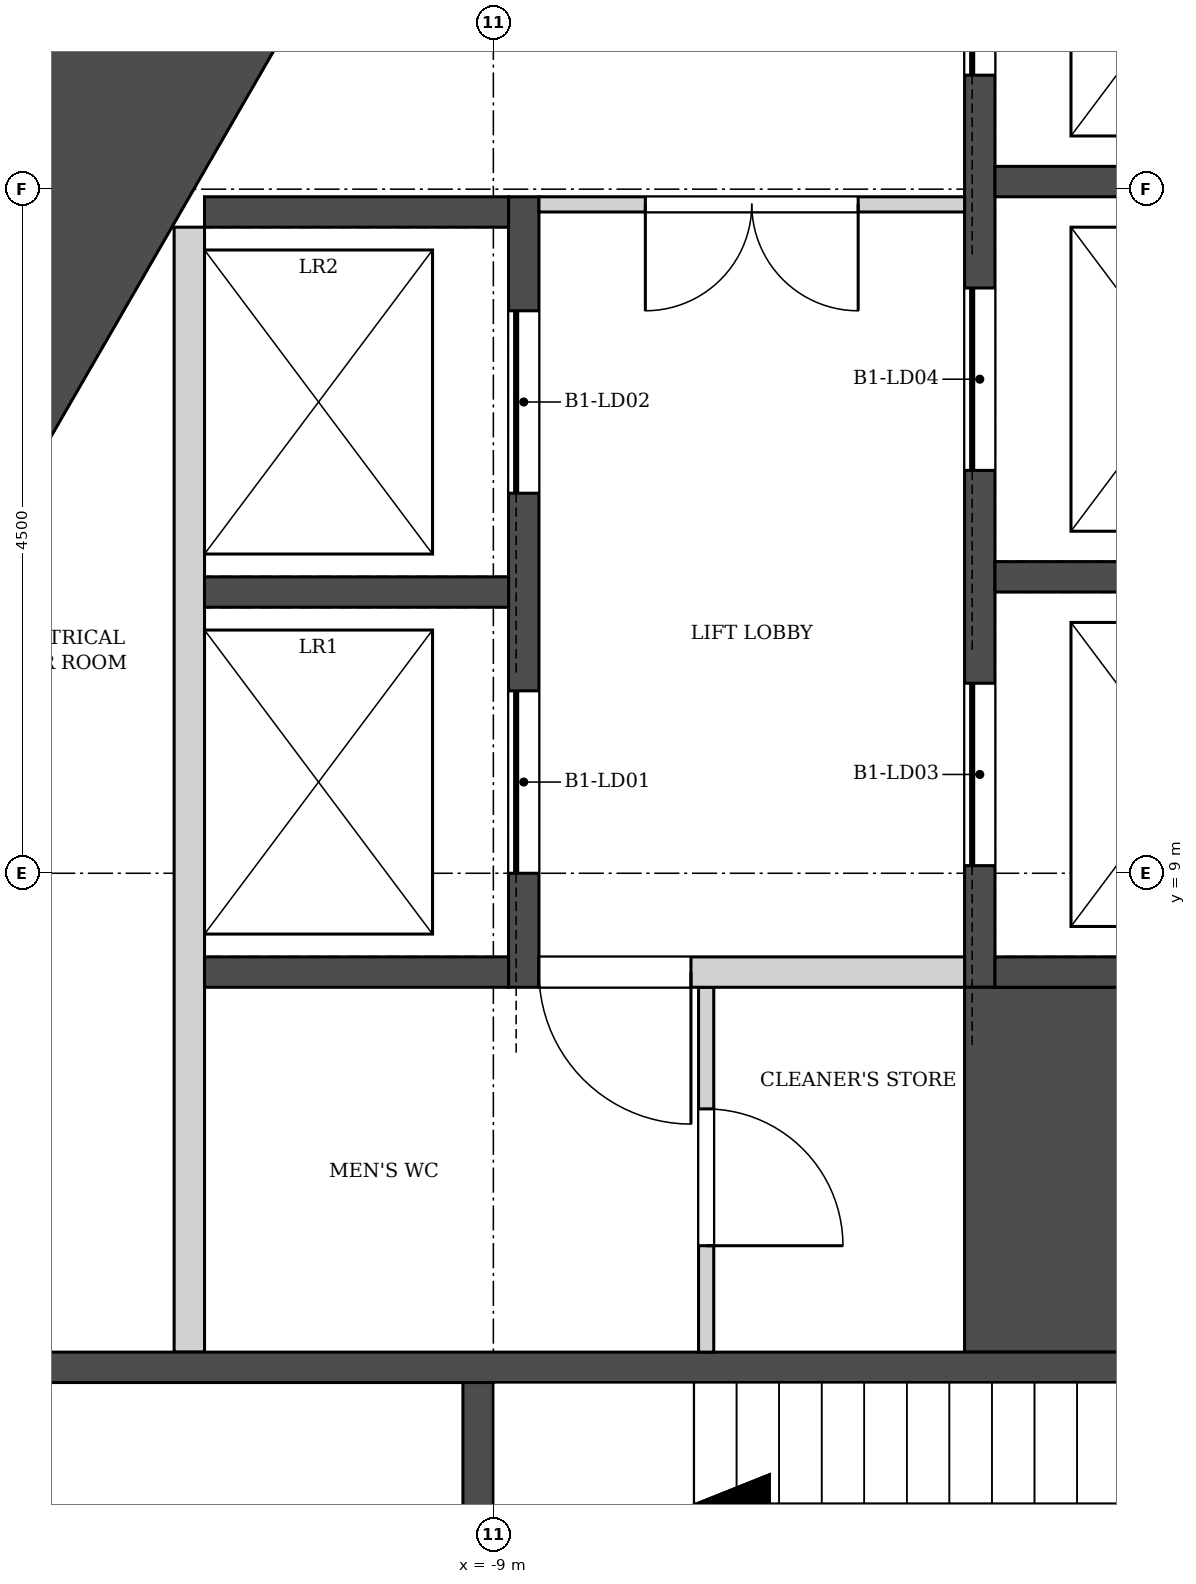
"""IFC4 building model, lengths in metres.
Left out: names, types, materials, properties, quantities, classifications, styles, units other than length and angle.
Written with IfcOpenShell. Run it as: python <this file> out.ifc"""

import sys

from ifc_helpers import new_model, si_unit, direction, frame, frame_2d, origin, place, context, subcontext, project, spatial, rectangle, extrude, element, fill, save


model = new_model("IFC4")
c1 = context("Model", 3, precision=1e-05, world=origin(), true_north=direction((0.0, 1.0)))
c2 = subcontext(c1, "Body", "Model", "MODEL_VIEW")
j1 = project(units=[si_unit("LENGTHUNIT", "METRE"), si_unit("PLANEANGLEUNIT", "RADIAN")], contexts=[c1])
p1 = place(None, origin())
s1 = spatial("IfcSite", under=j1, at=p1, CompositionType="ELEMENT")
p2 = place(p1, origin())
s2 = spatial("IfcBuilding", under=s1, at=p2, CompositionType="ELEMENT")
p3 = place(p2, frame((0.0, 0.0, -8.0)))
s3 = spatial("IfcBuildingStorey", under=s2, at=p3, CompositionType="ELEMENT", Elevation=-8.0)
p4 = place(p3, frame((-4.856, 74.528, 0.0), z_axis=(0.0, 0.0, 1.0), x_axis=(-0.499999312333, -0.866025800809, 0.0)))
e1 = element("IfcWall", 1, at=p4, inside=s3, PredefinedType="SOLIDWALL", context=c2, shape_type="SweptSolid", body=[
    extrude(rectangle(XDim=76.231, YDim=0.6, at=frame_2d((38.115, 0.0))), origin(), (0.0, 0.0, 1.0), 7.6),
])
p5 = place(p3, frame((-8.805, 18.65, 0.0), z_axis=(0.0, 0.0, 1.0), x_axis=(-0.50000187635, -0.866024320471, 0.0)))
e2 = element("IfcWall", 2, at=p5, inside=s3, PredefinedType="SHEAR", context=c2, shape_type="SweptSolid", body=[
    extrude(rectangle(XDim=9.177, YDim=1.4, at=frame_2d((4.588, 0.0))), origin(), (0.0, 0.0, 1.0), 8.0),
])
p6 = place(p3, frame((-11.0, 5.85, 0.0), z_axis=(0.0, 0.0, 1.0), x_axis=(0.0, 1.0, 0.0)))
e3 = element("IfcWall", 3, at=p6, inside=s3, PredefinedType="SOLIDWALL", context=c2, shape_type="SweptSolid", body=[
    extrude(rectangle(XDim=7.4, YDim=0.2, at=frame_2d((3.7, 0.0))), origin(), (0.0, 0.0, 1.0), 7.6),
])
p7 = place(p3, frame((-8.8, 8.25, -0.35), z_axis=(0.0, 0.0, 1.0), x_axis=(0.0, 1.0, 0.0)))
e4 = element("IfcWall", 4, at=p7, inside=s3, PredefinedType="SOLIDWALL", context=c2, shape_type="SweptSolid", body=[
    extrude(rectangle(XDim=5.2, YDim=0.2, at=frame_2d((2.6, 0.0))), origin(), (0.0, 0.0, 1.0), 7.95),
])
p8 = place(p7, frame((0.75, 0.0, 0.35)))
e5 = element("IfcOpeningElement", 5, at=p8, cuts=e4, PredefinedType="OPENING", context=c2, shape_type="SweptSolid", body=[
    extrude(rectangle(XDim=1.2, YDim=2.1, at=frame_2d((0.6, 1.05))), frame((0.0, 0.11, 0.0), z_axis=(0.0, -1.0, 0.0), x_axis=(1.0, 0.0, 0.0)), (0.0, 0.0, 1.0), 0.22),
])
p9 = place(p7, frame((3.25, 0.0, 0.35)))
e6 = element("IfcOpeningElement", 6, at=p9, cuts=e4, PredefinedType="OPENING", context=c2, shape_type="SweptSolid", body=[
    extrude(rectangle(XDim=1.2, YDim=2.1, at=frame_2d((0.6, 1.05))), frame((0.0, 0.11, 0.0), z_axis=(0.0, -1.0, 0.0), x_axis=(1.0, 0.0, 0.0)), (0.0, 0.0, 1.0), 0.22),
])
p10 = place(p3, frame((-5.8, 8.25, -0.35), z_axis=(0.0, 0.0, 1.0), x_axis=(0.0, 1.0, 0.0)))
e7 = element("IfcWall", 7, at=p10, inside=s3, PredefinedType="SOLIDWALL", context=c2, shape_type="SweptSolid", body=[
    extrude(rectangle(XDim=8.0, YDim=0.2, at=frame_2d((4.0, 0.0))), origin(), (0.0, 0.0, 1.0), 7.95),
])
p11 = place(p10, frame((0.8, 0.0, 0.35)))
e8 = element("IfcOpeningElement", 8, at=p11, cuts=e7, PredefinedType="OPENING", context=c2, shape_type="SweptSolid", body=[
    extrude(rectangle(XDim=1.2, YDim=2.1, at=frame_2d((0.6, 1.05))), frame((0.0, 0.11, 0.0), z_axis=(0.0, -1.0, 0.0), x_axis=(1.0, 0.0, 0.0)), (0.0, 0.0, 1.0), 0.22),
])
p12 = place(p10, frame((3.4, 0.0, 0.35)))
e9 = element("IfcOpeningElement", 9, at=p12, cuts=e7, PredefinedType="OPENING", context=c2, shape_type="SweptSolid", body=[
    extrude(rectangle(XDim=1.2, YDim=2.1, at=frame_2d((0.6, 1.05))), frame((0.0, 0.11, 0.0), z_axis=(0.0, -1.0, 0.0), x_axis=(1.0, 0.0, 0.0)), (0.0, 0.0, 1.0), 0.22),
])
p13 = place(p10, frame((6.0, 0.0, 0.35)))
e10 = element("IfcOpeningElement", 10, at=p13, cuts=e7, PredefinedType="OPENING", context=c2, shape_type="SweptSolid", body=[
    extrude(rectangle(XDim=1.2, YDim=2.1, at=frame_2d((0.6, 1.05))), frame((0.0, 0.11, 0.0), z_axis=(0.0, -1.0, 0.0), x_axis=(1.0, 0.0, 0.0)), (0.0, 0.0, 1.0), 0.22),
])
p14 = place(p3, frame((-5.2, 5.85, -0.35), z_axis=(0.0, 0.0, 1.0), x_axis=(0.0, 1.0, 0.0)))
e11 = element("IfcWall", 11, at=p14, inside=s3, PredefinedType="SOLIDWALL", context=c2, shape_type="SweptSolid", body=[
    extrude(rectangle(XDim=2.4, YDim=1.4, at=frame_2d((1.2, 0.0))), origin(), (0.0, 0.0, 1.0), 7.95),
])
p15 = place(p3, frame((-10.9, 8.35, -0.35), z_axis=(0.0, 0.0, 1.0), x_axis=(1.0, 0.0, 0.0)))
e12 = element("IfcWall", 12, at=p15, inside=s3, PredefinedType="SOLIDWALL", context=c2, shape_type="SweptSolid", body=[
    extrude(rectangle(XDim=2.0, YDim=0.2, at=frame_2d((1.0, 0.0))), origin(), (0.0, 0.0, 1.0), 7.95),
])
p16 = place(p3, frame((-5.7, 8.35, -0.35), z_axis=(0.0, 0.0, 1.0), x_axis=(1.0, 0.0, 0.0)))
e13 = element("IfcWall", 13, at=p16, inside=s3, PredefinedType="SOLIDWALL", context=c2, shape_type="SweptSolid", body=[
    extrude(rectangle(XDim=4.2, YDim=0.2, at=frame_2d((2.1, 0.0))), origin(), (0.0, 0.0, 1.0), 7.95),
])
p17 = place(p3, frame((-12.6, 5.75, -0.35), z_axis=(0.0, 0.0, 1.0), x_axis=(1.0, 0.0, 0.0)))
e14 = element("IfcWall", 14, at=p17, inside=s3, PredefinedType="SOLIDWALL", context=c2, shape_type="SweptSolid", body=[
    extrude(rectangle(XDim=11.4, YDim=0.2, at=frame_2d((5.7, 0.0))), origin(), (0.0, 0.0, 1.0), 7.95),
])
p18 = place(p3, frame((-9.1, 2.25, -0.35), z_axis=(0.0, 0.0, 1.0), x_axis=(0.0, 1.0, 0.0)))
e15 = element("IfcWall", 15, at=p18, inside=s3, PredefinedType="SOLIDWALL", context=c2, shape_type="SweptSolid", body=[
    extrude(rectangle(XDim=3.4, YDim=0.2, at=frame_2d((1.7, 0.0))), origin(), (0.0, 0.0, 1.0), 7.95),
])
p19 = place(p18, frame((0.2, 0.0, 0.35)))
e16 = element("IfcOpeningElement", 16, at=p19, cuts=e15, PredefinedType="OPENING", context=c2, shape_type="SweptSolid", body=[
    extrude(rectangle(XDim=1.2, YDim=2.1, at=frame_2d((0.6, 1.05))), frame((0.0, 0.11, 0.0), z_axis=(0.0, -1.0, 0.0), x_axis=(1.0, 0.0, 0.0)), (0.0, 0.0, 1.0), 0.22),
])
for number, where, z_axis, x_axis in (
    (17, (-10.9, 10.85, -0.35), (0.0, 0.0, 1.0), (1.0, 0.0, 0.0)),
    (18, (-10.9, 13.35, -0.35), (0.0, 0.0, 1.0), (1.0, 0.0, 0.0)),
    (19, (-5.7, 10.95, -0.35), (0.0, 0.0, 1.0), (1.0, 0.0, 0.0)),
    (20, (-5.7, 13.55, -0.35), (0.0, 0.0, 1.0), (1.0, 0.0, 0.0)),
):
    element("IfcWall", number, at=place(p3, frame(where, z_axis=z_axis, x_axis=x_axis)), inside=s3, PredefinedType="SOLIDWALL", context=c2, shape_type="SweptSolid", body=[
        extrude(rectangle(XDim=2.0, YDim=0.2, at=frame_2d((1.0, 0.0))), origin(), (0.0, 0.0, 1.0), 7.95),
    ])
p20 = place(p3, frame((-8.7, 13.4, 0.0), z_axis=(0.0, 0.0, 1.0), x_axis=(1.0, 0.0, 0.0)))
e21 = element("IfcWall", 21, at=p20, inside=s3, PredefinedType="PARTITIONING", context=c2, shape_type="SweptSolid", body=[
    extrude(rectangle(XDim=2.8, YDim=0.1, at=frame_2d((1.4, 0.0))), origin(), (0.0, 0.0, 1.0), 7.6),
])
p21 = place(p20, frame((0.7, 0.0, 0.0)))
e22 = element("IfcOpeningElement", 22, at=p21, cuts=e21, PredefinedType="OPENING", context=c2, shape_type="SweptSolid", body=[
    extrude(rectangle(XDim=1.4, YDim=2.1, at=frame_2d((0.7, 1.05))), frame((0.0, 0.06, 0.0), z_axis=(0.0, -1.0, 0.0), x_axis=(1.0, 0.0, 0.0)), (0.0, 0.0, 1.0), 0.12),
])
p22 = place(p3, frame((-7.6, 5.85, 0.0), z_axis=(0.0, 0.0, 1.0), x_axis=(0.0, 1.0, 0.0)))
e23 = element("IfcWall", 23, at=p22, inside=s3, PredefinedType="PARTITIONING", context=c2, shape_type="SweptSolid", body=[
    extrude(rectangle(XDim=2.4, YDim=0.1, at=frame_2d((1.2, 0.0))), origin(), (0.0, 0.0, 1.0), 7.6),
])
p23 = place(p22, frame((0.7, 0.0, 0.0)))
e24 = element("IfcOpeningElement", 24, at=p23, cuts=e23, PredefinedType="OPENING", context=c2, shape_type="SweptSolid", body=[
    extrude(rectangle(XDim=0.9, YDim=2.1, at=frame_2d((0.45, 1.05))), frame((0.0, 0.06, 0.0), z_axis=(0.0, -1.0, 0.0), x_axis=(1.0, 0.0, 0.0)), (0.0, 0.0, 1.0), 0.12),
])
p24 = place(p3, frame((-8.7, 8.35, 0.0), z_axis=(0.0, 0.0, 1.0), x_axis=(1.0, 0.0, 0.0)))
e25 = element("IfcWall", 25, at=p24, inside=s3, PredefinedType="SOLIDWALL", context=c2, shape_type="SweptSolid", body=[
    extrude(rectangle(XDim=2.8, YDim=0.2, at=frame_2d((1.4, 0.0))), origin(), (0.0, 0.0, 1.0), 7.6),
])
p25 = place(p24, origin())
e26 = element("IfcOpeningElement", 26, at=p25, cuts=e25, PredefinedType="OPENING", context=c2, shape_type="SweptSolid", body=[
    extrude(rectangle(XDim=1.0, YDim=2.1, at=frame_2d((0.5, 1.05))), frame((0.0, 0.11, 0.0), z_axis=(0.0, -1.0, 0.0), x_axis=(1.0, 0.0, 0.0)), (0.0, 0.0, 1.0), 0.22),
])
p26 = place(p8, origin())
e27 = element("IfcDoor", 27, at=p26, inside=s3, OperationType="SLIDING_TO_LEFT", PredefinedType="DOOR", context=c2, shape_type="SweptSolid", body=[
    extrude(rectangle(XDim=1.2, YDim=2.1, at=frame_2d((0.6, 1.05))), frame((0.0, 0.025, 0.0), z_axis=(0.0, -1.0, 0.0), x_axis=(1.0, 0.0, 0.0)), (0.0, 0.0, 1.0), 0.05),
])
fill(e5, e27)
p27 = place(p9, origin())
e28 = element("IfcDoor", 28, at=p27, inside=s3, OperationType="SLIDING_TO_LEFT", PredefinedType="DOOR", context=c2, shape_type="SweptSolid", body=[
    extrude(rectangle(XDim=1.2, YDim=2.1, at=frame_2d((0.6, 1.05))), frame((0.0, 0.025, 0.0), z_axis=(0.0, -1.0, 0.0), x_axis=(1.0, 0.0, 0.0)), (0.0, 0.0, 1.0), 0.05),
])
fill(e6, e28)
p28 = place(p11, origin())
e29 = element("IfcDoor", 29, at=p28, inside=s3, OperationType="SLIDING_TO_LEFT", PredefinedType="DOOR", context=c2, shape_type="SweptSolid", body=[
    extrude(rectangle(XDim=1.2, YDim=2.1, at=frame_2d((0.6, 1.05))), frame((0.0, 0.025, 0.0), z_axis=(0.0, -1.0, 0.0), x_axis=(1.0, 0.0, 0.0)), (0.0, 0.0, 1.0), 0.05),
])
fill(e8, e29)
p29 = place(p12, origin())
e30 = element("IfcDoor", 30, at=p29, inside=s3, OperationType="SLIDING_TO_LEFT", PredefinedType="DOOR", context=c2, shape_type="SweptSolid", body=[
    extrude(rectangle(XDim=1.2, YDim=2.1, at=frame_2d((0.6, 1.05))), frame((0.0, 0.025, 0.0), z_axis=(0.0, -1.0, 0.0), x_axis=(1.0, 0.0, 0.0)), (0.0, 0.0, 1.0), 0.05),
])
fill(e9, e30)
p30 = place(p13, origin())
e31 = element("IfcDoor", 31, at=p30, inside=s3, OperationType="SLIDING_TO_LEFT", PredefinedType="DOOR", context=c2, shape_type="SweptSolid", body=[
    extrude(rectangle(XDim=1.2, YDim=2.1, at=frame_2d((0.6, 1.05))), frame((0.0, 0.025, 0.0), z_axis=(0.0, -1.0, 0.0), x_axis=(1.0, 0.0, 0.0)), (0.0, 0.0, 1.0), 0.05),
])
fill(e10, e31)
p31 = place(p21, frame((1.4, 0.0, 0.0), z_axis=(0.0, 0.0, 1.0), x_axis=(-1.0, 0.0, 0.0)))
e32 = element("IfcDoor", 32, at=p31, inside=s3, OperationType="DOUBLE_DOOR_SINGLE_SWING", PredefinedType="DOOR", context=c2, shape_type="SweptSolid", body=[
    extrude(rectangle(XDim=1.4, YDim=2.1, at=frame_2d((0.7, 1.05))), frame((0.0, 0.025, 0.0), z_axis=(0.0, -1.0, 0.0), x_axis=(1.0, 0.0, 0.0)), (0.0, 0.0, 1.0), 0.05),
])
fill(e22, e32)
p32 = place(p25, frame((1.0, 0.0, 0.0), z_axis=(0.0, 0.0, 1.0), x_axis=(-1.0, 0.0, 0.0)))
e33 = element("IfcDoor", 33, at=p32, inside=s3, OperationType="SINGLE_SWING_LEFT", PredefinedType="DOOR", context=c2, shape_type="SweptSolid", body=[
    extrude(rectangle(XDim=1.0, YDim=2.1, at=frame_2d((0.5, 1.05))), frame((0.0, 0.025, 0.0), z_axis=(0.0, -1.0, 0.0), x_axis=(1.0, 0.0, 0.0)), (0.0, 0.0, 1.0), 0.05),
])
fill(e26, e33)
p33 = place(p23, frame((0.9, 0.0, 0.0), z_axis=(0.0, 0.0, 1.0), x_axis=(-1.0, 0.0, 0.0)))
e34 = element("IfcDoor", 34, at=p33, inside=s3, OperationType="SINGLE_SWING_RIGHT", PredefinedType="DOOR", context=c2, shape_type="SweptSolid", body=[
    extrude(rectangle(XDim=0.9, YDim=2.1, at=frame_2d((0.45, 1.05))), frame((0.0, 0.025, 0.0), z_axis=(0.0, -1.0, 0.0), x_axis=(1.0, 0.0, 0.0)), (0.0, 0.0, 1.0), 0.05),
])
fill(e24, e34)
save(model, sys.argv[1])
